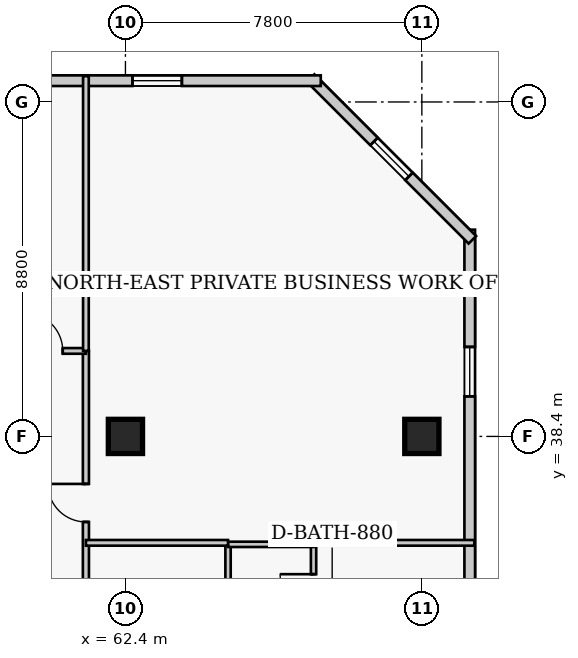
"""IFC4 building model, lengths in metres.
Left out: names, types, materials, properties, quantities, classifications, styles, units other than length and angle.
Written with IfcOpenShell. Run it as: python <this file> out.ifc"""

import sys

from ifc_helpers import new_model, si_unit, direction, frame, frame_2d, origin, origin_2d, place, context, subcontext, project, spatial, rectangle, extrude, element, fill, save


model = new_model("IFC4")
c1 = context("Model", 3, precision=1e-05, world=origin(), true_north=direction((0.0, 1.0)))
c2 = subcontext(c1, "Body", "Model", "MODEL_VIEW")
j1 = project(units=[si_unit("LENGTHUNIT", "METRE"), si_unit("PLANEANGLEUNIT", "RADIAN")], contexts=[c1])
p1 = place(None, origin())
s1 = spatial("IfcSite", under=j1, at=p1, CompositionType="ELEMENT")
p2 = place(p1, origin())
s2 = spatial("IfcBuilding", under=s1, at=p2, CompositionType="ELEMENT")
p3 = place(p2, frame((0.0, 0.0, 196.8)))
s3 = spatial("IfcBuildingStorey", under=s2, at=p3, CompositionType="ELEMENT", Elevation=196.8)
for number, where, z_axis, x_axis in (
    (1, (62.4, 38.4, 0.0), (0.0, 0.0, 1.0), (1.0, 0.0, 0.0)),
    (2, (70.2, 38.4, 0.0), (0.0, 0.0, 1.0), (1.0, 0.0, 0.0)),
):
    element("IfcColumn", number, at=place(p3, frame(where, z_axis=z_axis, x_axis=x_axis)), inside=s3, PredefinedType="COLUMN", context=c2, shape_type="SweptSolid", body=[
        extrude(rectangle(XDim=0.9, YDim=0.9, at=origin_2d()), origin(), (0.0, 0.0, 1.0), 3.9),
    ])
p4 = place(p3, frame((71.46, 13.96, 0.0), z_axis=(0.0, 0.0, 1.0), x_axis=(0.0, 1.0, 0.0)))
e3 = element("IfcWall", 3, at=p4, inside=s3, PredefinedType="SOLIDWALL", context=c2, shape_type="SweptSolid", body=[
    extrude(rectangle(XDim=29.88, YDim=0.28, at=frame_2d((14.94, 0.0))), origin(), (0.0, 0.0, 1.0), 3.65),
])
p5 = place(p4, frame((3.085, 0.0, 0.85)))
e4 = element("IfcOpeningElement", 4, at=p5, cuts=e3, PredefinedType="OPENING", context=c2, shape_type="SweptSolid", body=[
    extrude(rectangle(XDim=1.3, YDim=1.7, at=frame_2d((0.65, 0.85))), frame((0.0, 0.15, 0.0), z_axis=(0.0, -1.0, 0.0), x_axis=(1.0, 0.0, 0.0)), (0.0, 0.0, 1.0), 0.3),
])
p6 = place(p4, frame((10.555, 0.0, 0.85)))
e5 = element("IfcOpeningElement", 5, at=p6, cuts=e3, PredefinedType="OPENING", context=c2, shape_type="SweptSolid", body=[
    extrude(rectangle(XDim=1.3, YDim=1.7, at=frame_2d((0.65, 0.85))), frame((0.0, 0.15, 0.0), z_axis=(0.0, -1.0, 0.0), x_axis=(1.0, 0.0, 0.0)), (0.0, 0.0, 1.0), 0.3),
])
p7 = place(p4, frame((18.025, 0.0, 0.85)))
e6 = element("IfcOpeningElement", 6, at=p7, cuts=e3, PredefinedType="OPENING", context=c2, shape_type="SweptSolid", body=[
    extrude(rectangle(XDim=1.3, YDim=1.7, at=frame_2d((0.65, 0.85))), frame((0.0, 0.15, 0.0), z_axis=(0.0, -1.0, 0.0), x_axis=(1.0, 0.0, 0.0)), (0.0, 0.0, 1.0), 0.3),
])
p8 = place(p4, frame((25.495, 0.0, 0.85)))
e7 = element("IfcOpeningElement", 7, at=p8, cuts=e3, PredefinedType="OPENING", context=c2, shape_type="SweptSolid", body=[
    extrude(rectangle(XDim=1.3, YDim=1.7, at=frame_2d((0.65, 0.85))), frame((0.0, 0.15, 0.0), z_axis=(0.0, -1.0, 0.0), x_axis=(1.0, 0.0, 0.0)), (0.0, 0.0, 1.0), 0.3),
])
p9 = place(p3, frame((71.529, 43.573, 0.0), z_axis=(0.0, 0.0, 1.0), x_axis=(-0.707106781187, 0.707106781187, 0.0)))
e8 = element("IfcWall", 8, at=p9, inside=s3, PredefinedType="SOLIDWALL", context=c2, shape_type="SweptSolid", body=[
    extrude(rectangle(XDim=6.02, YDim=0.28, at=frame_2d((3.01, 0.0))), origin(), (0.0, 0.0, 1.0), 3.65),
])
p10 = place(p9, frame((2.36, 0.0, 0.85)))
e9 = element("IfcOpeningElement", 9, at=p10, cuts=e8, PredefinedType="OPENING", context=c2, shape_type="SweptSolid", body=[
    extrude(rectangle(XDim=1.3, YDim=1.7, at=frame_2d((0.65, 0.85))), frame((0.0, 0.15, 0.0), z_axis=(0.0, -1.0, 0.0), x_axis=(1.0, 0.0, 0.0)), (0.0, 0.0, 1.0), 0.3),
])
p11 = place(p3, frame((67.54, 47.76, 0.0), z_axis=(0.0, 0.0, 1.0), x_axis=(-1.0, 0.0, 0.0)))
e10 = element("IfcWall", 10, at=p11, inside=s3, PredefinedType="SOLIDWALL", context=c2, shape_type="SweptSolid", body=[
    extrude(rectangle(XDim=25.83, YDim=0.28, at=frame_2d((12.915, 0.0))), origin(), (0.0, 0.0, 1.0), 3.65),
])
p12 = place(p11, frame((3.655, 0.0, 0.85)))
e11 = element("IfcOpeningElement", 11, at=p12, cuts=e10, PredefinedType="OPENING", context=c2, shape_type="SweptSolid", body=[
    extrude(rectangle(XDim=1.3, YDim=1.7, at=frame_2d((0.65, 0.85))), frame((0.0, 0.15, 0.0), z_axis=(0.0, -1.0, 0.0), x_axis=(1.0, 0.0, 0.0)), (0.0, 0.0, 1.0), 0.3),
])
p13 = place(p11, frame((22.025, 0.0, 0.85)))
e12 = element("IfcOpeningElement", 12, at=p13, cuts=e10, PredefinedType="OPENING", context=c2, shape_type="SweptSolid", body=[
    extrude(rectangle(XDim=1.3, YDim=1.7, at=frame_2d((0.65, 0.85))), frame((0.0, 0.15, 0.0), z_axis=(0.0, -1.0, 0.0), x_axis=(1.0, 0.0, 0.0)), (0.0, 0.0, 1.0), 0.3),
])
p14 = place(p3, frame((61.36, 11.95, 0.0), z_axis=(0.0, 0.0, 1.0), x_axis=(0.0, 1.0, 0.0)))
e13 = element("IfcWall", 13, at=p14, inside=s3, PredefinedType="PARTITIONING", context=c2, shape_type="SweptSolid", body=[
    extrude(rectangle(XDim=28.7, YDim=0.16, at=frame_2d((14.35, 0.0))), origin(), (0.0, 0.0, 1.0), 3.65),
])
p15 = place(p14, frame((3.55, 0.0, 0.0)))
e14 = element("IfcOpeningElement", 14, at=p15, cuts=e13, PredefinedType="OPENING", context=c2, shape_type="SweptSolid", body=[
    extrude(rectangle(XDim=0.95, YDim=2.1, at=frame_2d((0.475, 1.05))), frame((0.0, 0.09, 0.0), z_axis=(0.0, -1.0, 0.0), x_axis=(1.0, 0.0, 0.0)), (0.0, 0.0, 1.0), 0.18),
])
p16 = place(p14, frame((11.975, 0.0, 0.0)))
e15 = element("IfcOpeningElement", 15, at=p16, cuts=e13, PredefinedType="OPENING", context=c2, shape_type="SweptSolid", body=[
    extrude(rectangle(XDim=0.95, YDim=2.1, at=frame_2d((0.475, 1.05))), frame((0.0, 0.09, 0.0), z_axis=(0.0, -1.0, 0.0), x_axis=(1.0, 0.0, 0.0)), (0.0, 0.0, 1.0), 0.18),
])
p17 = place(p14, frame((19.775, 0.0, 0.0)))
e16 = element("IfcOpeningElement", 16, at=p17, cuts=e13, PredefinedType="OPENING", context=c2, shape_type="SweptSolid", body=[
    extrude(rectangle(XDim=0.95, YDim=2.1, at=frame_2d((0.475, 1.05))), frame((0.0, 0.09, 0.0), z_axis=(0.0, -1.0, 0.0), x_axis=(1.0, 0.0, 0.0)), (0.0, 0.0, 1.0), 0.18),
])
p18 = place(p14, frame((24.2, 0.0, 0.0)))
e17 = element("IfcOpeningElement", 17, at=p18, cuts=e13, PredefinedType="OPENING", context=c2, shape_type="SweptSolid", body=[
    extrude(rectangle(XDim=1.0, YDim=2.15, at=frame_2d((0.5, 1.075))), frame((0.0, 0.09, 0.0), z_axis=(0.0, -1.0, 0.0), x_axis=(1.0, 0.0, 0.0)), (0.0, 0.0, 1.0), 0.18),
])
p19 = place(p3, frame((56.8, 40.65, 0.0), z_axis=(0.0, 0.0, 1.0), x_axis=(1.0, 0.0, 0.0)))
e18 = element("IfcWall", 18, at=p19, inside=s3, PredefinedType="PARTITIONING", context=c2, shape_type="SweptSolid", body=[
    extrude(rectangle(XDim=4.56, YDim=0.15, at=frame_2d((2.28, 0.0))), origin(), (0.0, 0.0, 1.0), 3.65),
])
p20 = place(p19, frame((2.95, 0.0, 0.0)))
e19 = element("IfcOpeningElement", 19, at=p20, cuts=e18, PredefinedType="OPENING", context=c2, shape_type="SweptSolid", body=[
    extrude(rectangle(XDim=1.0, YDim=2.15, at=frame_2d((0.5, 1.075))), frame((0.0, 0.085, 0.0), z_axis=(0.0, -1.0, 0.0), x_axis=(1.0, 0.0, 0.0)), (0.0, 0.0, 1.0), 0.17),
])
p21 = place(p3, frame((61.36, 40.65, 0.0), z_axis=(0.0, 0.0, 1.0), x_axis=(0.0, 1.0, 0.0)))
e20 = element("IfcWall", 20, at=p21, inside=s3, PredefinedType="PARTITIONING", context=c2, shape_type="SweptSolid", body=[
    extrude(rectangle(XDim=7.23, YDim=0.15, at=frame_2d((3.615, 0.0))), origin(), (0.0, 0.0, 1.0), 3.65),
])
p22 = place(p3, frame((65.1, 33.11, 0.0), z_axis=(0.0, 0.0, 1.0), x_axis=(0.0, 1.0, 0.0)))
e21 = element("IfcWall", 21, at=p22, inside=s3, PredefinedType="PLUMBINGWALL", context=c2, shape_type="SweptSolid", body=[
    extrude(rectangle(XDim=2.45, YDim=0.14, at=frame_2d((1.225, 0.0))), origin(), (0.0, 0.0, 1.0), 3.65),
])
p23 = place(p3, frame((67.35, 33.11, 0.0), z_axis=(0.0, 0.0, 1.0), x_axis=(0.0, 1.0, 0.0)))
e22 = element("IfcWall", 22, at=p23, inside=s3, PredefinedType="PLUMBINGWALL", context=c2, shape_type="SweptSolid", body=[
    extrude(rectangle(XDim=2.45, YDim=0.14, at=frame_2d((1.225, 0.0))), origin(), (0.0, 0.0, 1.0), 3.65),
])
p24 = place(p23, frame((0.785, 0.0, 0.0)))
e23 = element("IfcOpeningElement", 23, at=p24, cuts=e22, PredefinedType="OPENING", context=c2, shape_type="SweptSolid", body=[
    extrude(rectangle(XDim=0.88, YDim=2.05, at=frame_2d((0.44, 1.025))), frame((0.0, 0.08, 0.0), z_axis=(0.0, -1.0, 0.0), x_axis=(1.0, 0.0, 0.0)), (0.0, 0.0, 1.0), 0.16),
])
p25 = place(p3, frame((65.1, 35.56, 0.0), z_axis=(0.0, 0.0, 1.0), x_axis=(1.0, 0.0, 0.0)))
e24 = element("IfcWall", 24, at=p25, inside=s3, PredefinedType="PLUMBINGWALL", context=c2, shape_type="SweptSolid", body=[
    extrude(rectangle(XDim=2.25, YDim=0.14, at=frame_2d((1.125, 0.0))), origin(), (0.0, 0.0, 1.0), 3.65),
])
p26 = place(p3, frame((61.36, 35.6, 0.0), z_axis=(0.0, 0.0, 1.0), x_axis=(1.0, 0.0, 0.0)))
e25 = element("IfcWall", 25, at=p26, inside=s3, PredefinedType="PARTITIONING", context=c2, shape_type="SweptSolid", body=[
    extrude(rectangle(XDim=3.74, YDim=0.15, at=frame_2d((1.87, 0.0))), origin(), (0.0, 0.0, 1.0), 3.65),
])
p27 = place(p3, frame((67.35, 35.6, 0.0), z_axis=(0.0, 0.0, 1.0), x_axis=(1.0, 0.0, 0.0)))
e26 = element("IfcWall", 26, at=p27, inside=s3, PredefinedType="PARTITIONING", context=c2, shape_type="SweptSolid", body=[
    extrude(rectangle(XDim=4.23, YDim=0.15, at=frame_2d((2.115, 0.0))), origin(), (0.0, 0.0, 1.0), 3.65),
])
p28 = place(p8, origin())
e27 = element("IfcWindow", 27, at=p28, inside=s3, PartitioningType="SINGLE_PANEL", PredefinedType="WINDOW", context=c2, shape_type="SweptSolid", body=[
    extrude(rectangle(XDim=1.3, YDim=1.7, at=frame_2d((0.65, 0.85))), frame((0.0, 0.03, 0.0), z_axis=(0.0, -1.0, 0.0), x_axis=(1.0, 0.0, 0.0)), (0.0, 0.0, 1.0), 0.06),
])
fill(e7, e27)
p29 = place(p10, origin())
e28 = element("IfcWindow", 28, at=p29, inside=s3, PartitioningType="SINGLE_PANEL", PredefinedType="WINDOW", context=c2, shape_type="SweptSolid", body=[
    extrude(rectangle(XDim=1.3, YDim=1.7, at=frame_2d((0.65, 0.85))), frame((0.0, 0.03, 0.0), z_axis=(0.0, -1.0, 0.0), x_axis=(1.0, 0.0, 0.0)), (0.0, 0.0, 1.0), 0.06),
])
fill(e9, e28)
p30 = place(p12, origin())
e29 = element("IfcWindow", 29, at=p30, inside=s3, PartitioningType="SINGLE_PANEL", PredefinedType="WINDOW", context=c2, shape_type="SweptSolid", body=[
    extrude(rectangle(XDim=1.3, YDim=1.7, at=frame_2d((0.65, 0.85))), frame((0.0, 0.03, 0.0), z_axis=(0.0, -1.0, 0.0), x_axis=(1.0, 0.0, 0.0)), (0.0, 0.0, 1.0), 0.06),
])
fill(e11, e29)
p31 = place(p20, origin())
e30 = element("IfcDoor", 30, at=p31, inside=s3, OperationType="SINGLE_SWING_LEFT", PredefinedType="DOOR", context=c2, shape_type="SweptSolid", body=[
    extrude(rectangle(XDim=1.0, YDim=2.15, at=frame_2d((0.5, 1.075))), frame((0.0, 0.025, 0.0), z_axis=(0.0, -1.0, 0.0), x_axis=(1.0, 0.0, 0.0)), (0.0, 0.0, 1.0), 0.05),
])
fill(e19, e30)
p32 = place(p24, origin())
e31 = element("IfcDoor", 31, at=p32, inside=s3, OperationType="SINGLE_SWING_RIGHT", PredefinedType="DOOR", context=c2, shape_type="SweptSolid", body=[
    extrude(rectangle(XDim=0.88, YDim=2.05, at=frame_2d((0.44, 1.025))), frame((0.0, 0.025, 0.0), z_axis=(0.0, -1.0, 0.0), x_axis=(1.0, 0.0, 0.0)), (0.0, 0.0, 1.0), 0.05),
])
fill(e23, e31)
p33 = place(p18, origin())
e32 = element("IfcDoor", 32, at=p33, inside=s3, OperationType="SINGLE_SWING_RIGHT", PredefinedType="DOOR", context=c2, shape_type="SweptSolid", body=[
    extrude(rectangle(XDim=1.0, YDim=2.15, at=frame_2d((0.5, 1.075))), frame((0.0, 0.025, 0.0), z_axis=(0.0, -1.0, 0.0), x_axis=(1.0, 0.0, 0.0)), (0.0, 0.0, 1.0), 0.05),
])
fill(e17, e32)
save(model, sys.argv[1])
